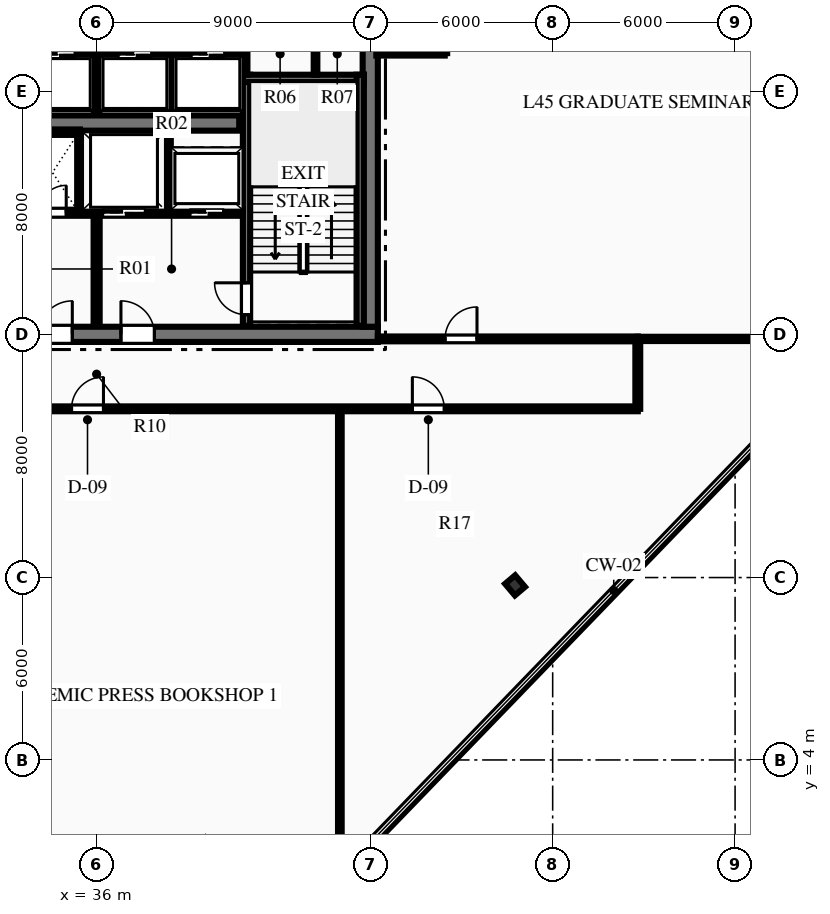
"""IFC4 building model, lengths in metres.
Left out: names, types, materials, properties, quantities, classifications, styles, units other than length and angle.
Written with IfcOpenShell. Run it as: python <this file> out.ifc"""

import sys

from ifc_helpers import new_model, si_unit, direction, frame, frame_2d, origin, origin_2d, place, context, subcontext, project, spatial, rectangle, i_section, extrude, element, fill, save


model = new_model("IFC4")
c1 = context("Model", 3, precision=1e-05, world=origin(), true_north=direction((0.0, 1.0)))
c2 = subcontext(c1, "Body", "Model", "MODEL_VIEW")
j1 = project(units=[si_unit("LENGTHUNIT", "METRE"), si_unit("PLANEANGLEUNIT", "RADIAN")], contexts=[c1])
p1 = place(None, origin())
s1 = spatial("IfcSite", under=j1, at=p1, CompositionType="ELEMENT")
p2 = place(p1, origin())
s2 = spatial("IfcBuilding", under=s1, at=p2, CompositionType="ELEMENT")
p3 = place(p2, frame((0.0, 0.0, 181.95)))
s3 = spatial("IfcBuildingStorey", under=s2, at=p3, CompositionType="ELEMENT", Elevation=181.95)
p4 = place(p3, frame((26.75, 18.0, 0.0), z_axis=(0.0, 0.0, 1.0), x_axis=(1.0, 0.0, 0.0)))
e1 = element("IfcWall", 1, at=p4, inside=s3, PredefinedType="SHEAR", context=c2, shape_type="SweptSolid", body=[
    extrude(rectangle(XDim=18.5, YDim=0.5, at=frame_2d((9.25, 0.0))), origin(), (0.0, 0.0, 1.0), 3.75),
])
p5 = place(p4, frame((7.35, 0.0, 0.0)))
e2 = element("IfcOpeningElement", 2, at=p5, cuts=e1, PredefinedType="OPENING", context=c2, shape_type="SweptSolid", body=[
    extrude(rectangle(XDim=1.1, YDim=2.15, at=frame_2d((0.55, 1.075))), frame((0.0, 0.26, 0.0), z_axis=(0.0, -1.0, 0.0), x_axis=(1.0, 0.0, 0.0)), (0.0, 0.0, 1.0), 0.52),
])
p6 = place(p4, frame((10.05, 0.0, 0.0)))
e3 = element("IfcOpeningElement", 3, at=p6, cuts=e1, PredefinedType="OPENING", context=c2, shape_type="SweptSolid", body=[
    extrude(rectangle(XDim=1.1, YDim=2.15, at=frame_2d((0.55, 1.075))), frame((0.0, 0.26, 0.0), z_axis=(0.0, -1.0, 0.0), x_axis=(1.0, 0.0, 0.0)), (0.0, 0.0, 1.0), 0.52),
])
p7 = place(p3, frame((45.0, 18.25, 0.0), z_axis=(0.0, 0.0, 1.0), x_axis=(0.0, 1.0, 0.0)))
e4 = element("IfcWall", 4, at=p7, inside=s3, PredefinedType="SHEAR", context=c2, shape_type="SweptSolid", body=[
    extrude(rectangle(XDim=15.5, YDim=0.5, at=frame_2d((7.75, 0.0))), origin(), (0.0, 0.0, 1.0), 3.75),
])
p8 = place(p7, frame((9.99, 0.0, 0.0)))
e5 = element("IfcOpeningElement", 5, at=p8, cuts=e4, PredefinedType="OPENING", context=c2, shape_type="SweptSolid", body=[
    extrude(rectangle(XDim=1.4, YDim=2.2, at=frame_2d((0.7, 1.1))), frame((0.0, 0.26, 0.0), z_axis=(0.0, -1.0, 0.0), x_axis=(1.0, 0.0, 0.0)), (0.0, 0.0, 1.0), 0.52),
])
p9 = place(p3, frame((31.31, 24.95, 0.0), z_axis=(0.0, 0.0, 1.0), x_axis=(1.0, 0.0, 0.0)))
e6 = element("IfcWall", 6, at=p9, inside=s3, PredefinedType="SHEAR", context=c2, shape_type="SweptSolid", body=[
    extrude(rectangle(XDim=9.38, YDim=0.5, at=frame_2d((4.69, 0.0))), origin(), (0.0, 0.0, 1.0), 3.75),
])
p10 = place(p3, frame((40.93, 18.28, 0.0), z_axis=(0.0, 0.0, 1.0), x_axis=(0.0, 1.0, 0.0)))
e7 = element("IfcWall", 7, at=p10, inside=s3, PredefinedType="SHEAR", context=c2, shape_type="SweptSolid", body=[
    extrude(rectangle(XDim=8.26, YDim=0.24, at=frame_2d((4.13, 0.0))), origin(), (0.0, 0.0, 1.0), 3.75),
])
p11 = place(p10, frame((0.365, 0.0, 0.0)))
e8 = element("IfcOpeningElement", 8, at=p11, cuts=e7, PredefinedType="OPENING", context=c2, shape_type="SweptSolid", body=[
    extrude(rectangle(XDim=1.05, YDim=2.15, at=frame_2d((0.525, 1.075))), frame((0.0, 0.13, 0.0), z_axis=(0.0, -1.0, 0.0), x_axis=(1.0, 0.0, 0.0)), (0.0, 0.0, 1.0), 0.26),
])
p12 = place(p3, frame((40.81, 26.42, 0.0), z_axis=(0.0, 0.0, 1.0), x_axis=(1.0, 0.0, 0.0)))
e9 = element("IfcWall", 9, at=p12, inside=s3, PredefinedType="SHEAR", context=c2, shape_type="SweptSolid", body=[
    extrude(rectangle(XDim=3.98, YDim=0.24, at=frame_2d((1.99, 0.0))), origin(), (0.0, 0.0, 1.0), 3.75),
])
p13 = place(p3, frame((44.67, 18.28, 0.0), z_axis=(0.0, 0.0, 1.0), x_axis=(0.0, 1.0, 0.0)))
e10 = element("IfcWall", 10, at=p13, inside=s3, PredefinedType="SHEAR", context=c2, shape_type="SweptSolid", body=[
    extrude(rectangle(XDim=8.26, YDim=0.24, at=frame_2d((4.13, 0.0))), origin(), (0.0, 0.0, 1.0), 3.75),
])
p14 = place(p3, frame((49.762, 9.743, 0.0), z_axis=(0.0, 0.0, 1.0), x_axis=(0.763232469783, 0.646123979643, 0.0)))
e11 = element("IfcColumn", 11, at=p14, inside=s3, PredefinedType="COLUMN", context=c2, shape_type="SweptSolid", body=[
    extrude(i_section(OverallWidth=0.432, OverallDepth=0.498, WebThickness=0.056, FlangeThickness=0.089, at=origin_2d()), origin(), (0.0, 0.0, 1.0), 3.75),
])
p15 = place(p3, frame((36.0, 18.28, 0.0), z_axis=(0.0, 0.0, 1.0), x_axis=(0.0, 1.0, 0.0)))
e12 = element("IfcWall", 12, at=p15, inside=s3, PredefinedType="PARTITIONING", context=c2, shape_type="SweptSolid", body=[
    extrude(rectangle(XDim=3.77, YDim=0.2, at=frame_2d((1.885, 0.0))), origin(), (0.0, 0.0, 1.0), 3.46),
])
p16 = place(p3, frame((31.19, 22.0, 0.0), z_axis=(0.0, 0.0, 1.0), x_axis=(1.0, 0.0, 0.0)))
e13 = element("IfcWall", 13, at=p16, inside=s3, PredefinedType="PARTITIONING", context=c2, shape_type="SweptSolid", body=[
    extrude(rectangle(XDim=4.69, YDim=0.2, at=frame_2d((2.345, 0.0))), origin(), (0.0, 0.0, 1.0), 3.46),
])
p17 = place(p16, frame((2.91, 0.0, 0.0)))
e14 = element("IfcOpeningElement", 14, at=p17, cuts=e13, PredefinedType="OPENING", context=c2, shape_type="SweptSolid", body=[
    extrude(rectangle(XDim=0.9, YDim=2.15, at=frame_2d((0.45, 1.075))), frame((0.0, 0.11, 0.0), z_axis=(0.0, -1.0, 0.0), x_axis=(1.0, 0.0, 0.0)), (0.0, 0.0, 1.0), 0.22),
])
p18 = place(p16, frame((0.635, 0.0, 0.0)))
e15 = element("IfcOpeningElement", 15, at=p18, cuts=e13, PredefinedType="OPENING", context=c2, shape_type="SweptSolid", body=[
    extrude(rectangle(XDim=1.1, YDim=2.15, at=frame_2d((0.55, 1.075))), frame((0.0, 0.11, 0.0), z_axis=(0.0, -1.0, 0.0), x_axis=(1.0, 0.0, 0.0)), (0.0, 0.0, 1.0), 0.22),
])
p19 = place(p3, frame((36.12, 22.0, 0.0), z_axis=(0.0, 0.0, 1.0), x_axis=(1.0, 0.0, 0.0)))
e16 = element("IfcWall", 16, at=p19, inside=s3, PredefinedType="PARTITIONING", context=c2, shape_type="SweptSolid", body=[
    extrude(rectangle(XDim=4.69, YDim=0.2, at=frame_2d((2.345, 0.0))), origin(), (0.0, 0.0, 1.0), 3.46),
])
p20 = place(p19, frame((2.955, 0.0, 0.0)))
e17 = element("IfcOpeningElement", 17, at=p20, cuts=e16, PredefinedType="OPENING", context=c2, shape_type="SweptSolid", body=[
    extrude(rectangle(XDim=1.1, YDim=2.15, at=frame_2d((0.55, 1.075))), frame((0.0, 0.11, 0.0), z_axis=(0.0, -1.0, 0.0), x_axis=(1.0, 0.0, 0.0)), (0.0, 0.0, 1.0), 0.22),
])
p21 = place(p19, frame((0.08, 0.0, 0.0)))
e18 = element("IfcOpeningElement", 18, at=p21, cuts=e16, PredefinedType="OPENING", context=c2, shape_type="SweptSolid", body=[
    extrude(rectangle(XDim=1.4, YDim=2.2, at=frame_2d((0.7, 1.1))), frame((0.0, 0.11, 0.0), z_axis=(0.0, -1.0, 0.0), x_axis=(1.0, 0.0, 0.0)), (0.0, 0.0, 1.0), 0.22),
])
p22 = place(p3, frame((35.45, 22.05, 0.0), z_axis=(0.0, 0.0, 1.0), x_axis=(0.0, 1.0, 0.0)))
e19 = element("IfcWall", 19, at=p22, inside=s3, PredefinedType="PARTITIONING", context=c2, shape_type="SweptSolid", body=[
    extrude(rectangle(XDim=2.6, YDim=0.18, at=frame_2d((1.3, 0.0))), origin(), (0.0, 0.0, 1.0), 3.46),
])
p23 = place(p3, frame((33.65, 24.65, 0.0), z_axis=(0.0, 0.0, 1.0), x_axis=(1.0, 0.0, 0.0)))
e20 = element("IfcWall", 20, at=p23, inside=s3, PredefinedType="PARTITIONING", context=c2, shape_type="SweptSolid", body=[
    extrude(rectangle(XDim=1.8, YDim=0.18, at=frame_2d((0.9, 0.0))), origin(), (0.0, 0.0, 1.0), 3.46),
])
p24 = place(p3, frame((38.35, 22.05, 0.0), z_axis=(0.0, 0.0, 1.0), x_axis=(0.0, 1.0, 0.0)))
e21 = element("IfcWall", 21, at=p24, inside=s3, PredefinedType="PARTITIONING", context=c2, shape_type="SweptSolid", body=[
    extrude(rectangle(XDim=2.6, YDim=0.18, at=frame_2d((1.3, 0.0))), origin(), (0.0, 0.0, 1.0), 3.46),
])
p25 = place(p3, frame((40.88, 26.54, 0.0), z_axis=(0.0, 0.0, 1.0), x_axis=(0.0, 1.0, 0.0)))
e22 = element("IfcWall", 22, at=p25, inside=s3, PredefinedType="PARTITIONING", context=c2, shape_type="SweptSolid", body=[
    extrude(rectangle(XDim=1.51, YDim=0.16, at=frame_2d((0.755, 0.0))), origin(), (0.0, 0.0, 1.0), 3.46),
])
p26 = place(p3, frame((43.2, 26.54, 0.0), z_axis=(0.0, 0.0, 1.0), x_axis=(0.0, 1.0, 0.0)))
e23 = element("IfcWall", 23, at=p26, inside=s3, PredefinedType="PARTITIONING", context=c2, shape_type="SweptSolid", body=[
    extrude(rectangle(XDim=1.44, YDim=0.12, at=frame_2d((0.72, 0.0))), origin(), (0.0, 0.0, 1.0), 3.46),
])
p27 = place(p3, frame((31.2, 27.2, 0.0), z_axis=(0.0, 0.0, 1.0), x_axis=(1.0, 0.0, 0.0)))
e24 = element("IfcWall", 24, at=p27, inside=s3, PredefinedType="PARTITIONING", context=c2, shape_type="SweptSolid", body=[
    extrude(rectangle(XDim=9.6, YDim=0.18, at=frame_2d((4.8, 0.0))), origin(), (0.0, 0.0, 1.0), 3.46),
])
p28 = place(p27, frame((0.59, 0.0, 0.0)))
e25 = element("IfcOpeningElement", 25, at=p28, cuts=e24, PredefinedType="OPENING", context=c2, shape_type="SweptSolid", body=[
    extrude(rectangle(XDim=1.1, YDim=2.15, at=frame_2d((0.55, 1.075))), frame((0.0, 0.1, 0.0), z_axis=(0.0, -1.0, 0.0), x_axis=(1.0, 0.0, 0.0)), (0.0, 0.0, 1.0), 0.2),
])
p29 = place(p27, frame((2.99, 0.0, 0.0)))
e26 = element("IfcOpeningElement", 26, at=p29, cuts=e24, PredefinedType="OPENING", context=c2, shape_type="SweptSolid", body=[
    extrude(rectangle(XDim=1.1, YDim=2.15, at=frame_2d((0.55, 1.075))), frame((0.0, 0.1, 0.0), z_axis=(0.0, -1.0, 0.0), x_axis=(1.0, 0.0, 0.0)), (0.0, 0.0, 1.0), 0.2),
])
p30 = place(p27, frame((5.51, 0.0, 0.0)))
e27 = element("IfcOpeningElement", 27, at=p30, cuts=e24, PredefinedType="OPENING", context=c2, shape_type="SweptSolid", body=[
    extrude(rectangle(XDim=1.1, YDim=2.15, at=frame_2d((0.55, 1.075))), frame((0.0, 0.1, 0.0), z_axis=(0.0, -1.0, 0.0), x_axis=(1.0, 0.0, 0.0)), (0.0, 0.0, 1.0), 0.2),
])
p31 = place(p27, frame((7.91, 0.0, 0.0)))
e28 = element("IfcOpeningElement", 28, at=p31, cuts=e24, PredefinedType="OPENING", context=c2, shape_type="SweptSolid", body=[
    extrude(rectangle(XDim=1.1, YDim=2.15, at=frame_2d((0.55, 1.075))), frame((0.0, 0.1, 0.0), z_axis=(0.0, -1.0, 0.0), x_axis=(1.0, 0.0, 0.0)), (0.0, 0.0, 1.0), 0.2),
])
for number, where, z_axis, x_axis in (
    (29, (36.0, 25.3, 0.0), (0.0, 0.0, 1.0), (0.0, 1.0, 0.0)),
    (30, (38.46, 25.3, 0.0), (0.0, 0.0, 1.0), (0.0, 1.0, 0.0)),
):
    element("IfcWall", number, at=place(p3, frame(where, z_axis=z_axis, x_axis=x_axis)), inside=s3, PredefinedType="PARTITIONING", context=c2, shape_type="SweptSolid", body=[
        extrude(rectangle(XDim=1.9, YDim=0.18, at=frame_2d((0.95, 0.0))), origin(), (0.0, 0.0, 1.0), 3.46),
    ])
p32 = place(p3, frame((18.2, 15.55, 0.0), z_axis=(0.0, 0.0, 1.0), x_axis=(1.0, 0.0, 0.0)))
e31 = element("IfcWall", 31, at=p32, inside=s3, PredefinedType="PARTITIONING", context=c2, shape_type="SweptSolid", body=[
    extrude(rectangle(XDim=35.6, YDim=0.16, at=frame_2d((17.8, 0.0))), origin(), (0.0, 0.0, 1.0), 3.46),
])
p33 = place(p32, frame((7.55, 0.0, 0.0)))
e32 = element("IfcOpeningElement", 32, at=p33, cuts=e31, PredefinedType="OPENING", context=c2, shape_type="SweptSolid", body=[
    extrude(rectangle(XDim=0.9, YDim=2.15, at=frame_2d((0.45, 1.075))), frame((0.0, 0.09, 0.0), z_axis=(0.0, -1.0, 0.0), x_axis=(1.0, 0.0, 0.0)), (0.0, 0.0, 1.0), 0.18),
])
p34 = place(p32, frame((9.85, 0.0, 0.0)))
e33 = element("IfcOpeningElement", 33, at=p34, cuts=e31, PredefinedType="OPENING", context=c2, shape_type="SweptSolid", body=[
    extrude(rectangle(XDim=0.9, YDim=2.15, at=frame_2d((0.45, 1.075))), frame((0.0, 0.09, 0.0), z_axis=(0.0, -1.0, 0.0), x_axis=(1.0, 0.0, 0.0)), (0.0, 0.0, 1.0), 0.18),
])
p35 = place(p32, frame((12.1, 0.0, 0.0)))
e34 = element("IfcOpeningElement", 34, at=p35, cuts=e31, PredefinedType="OPENING", context=c2, shape_type="SweptSolid", body=[
    extrude(rectangle(XDim=1.0, YDim=2.15, at=frame_2d((0.5, 1.075))), frame((0.0, 0.09, 0.0), z_axis=(0.0, -1.0, 0.0), x_axis=(1.0, 0.0, 0.0)), (0.0, 0.0, 1.0), 0.18),
])
p36 = place(p32, frame((16.975, 0.0, 0.0)))
e35 = element("IfcOpeningElement", 35, at=p36, cuts=e31, PredefinedType="OPENING", context=c2, shape_type="SweptSolid", body=[
    extrude(rectangle(XDim=1.05, YDim=2.15, at=frame_2d((0.525, 1.075))), frame((0.0, 0.09, 0.0), z_axis=(0.0, -1.0, 0.0), x_axis=(1.0, 0.0, 0.0)), (0.0, 0.0, 1.0), 0.18),
])
p37 = place(p32, frame((28.185, 0.0, 0.0)))
e36 = element("IfcOpeningElement", 36, at=p37, cuts=e31, PredefinedType="OPENING", context=c2, shape_type="SweptSolid", body=[
    extrude(rectangle(XDim=1.05, YDim=2.15, at=frame_2d((0.525, 1.075))), frame((0.0, 0.09, 0.0), z_axis=(0.0, -1.0, 0.0), x_axis=(1.0, 0.0, 0.0)), (0.0, 0.0, 1.0), 0.18),
])
p38 = place(p3, frame((45.25, 17.85, 0.0), z_axis=(0.0, 0.0, 1.0), x_axis=(1.0, 0.0, 0.0)))
e37 = element("IfcWall", 37, at=p38, inside=s3, PredefinedType="PARTITIONING", context=c2, shape_type="SweptSolid", body=[
    extrude(rectangle(XDim=8.55, YDim=0.16, at=frame_2d((4.275, 0.0))), origin(), (0.0, 0.0, 1.0), 2.839),
])
p39 = place(p38, frame((2.211, 0.0, 0.0)))
e38 = element("IfcOpeningElement", 38, at=p39, cuts=e37, PredefinedType="OPENING", context=c2, shape_type="SweptSolid", body=[
    extrude(rectangle(XDim=1.05, YDim=2.15, at=frame_2d((0.525, 1.075))), frame((0.0, 0.09, 0.0), z_axis=(0.0, -1.0, 0.0), x_axis=(1.0, 0.0, 0.0)), (0.0, 0.0, 1.0), 0.18),
])
p40 = place(p3, frame((47.45, 27.25, 0.0), z_axis=(0.0, 0.0, 1.0), x_axis=(0.0, 1.0, 0.0)))
e39 = element("IfcWall", 39, at=p40, inside=s3, PredefinedType="PARTITIONING", context=c2, shape_type="SweptSolid", body=[
    extrude(rectangle(XDim=6.9, YDim=0.16, at=frame_2d((3.45, 0.0))), origin(), (0.0, 0.0, 1.0), 3.46),
])
p41 = place(p3, frame((45.2, 27.25, 0.0), z_axis=(0.0, 0.0, 1.0), x_axis=(1.0, 0.0, 0.0)))
e40 = element("IfcWall", 40, at=p41, inside=s3, PredefinedType="PARTITIONING", context=c2, shape_type="SweptSolid", body=[
    extrude(rectangle(XDim=2.25, YDim=0.16, at=frame_2d((1.125, 0.0))), origin(), (0.0, 0.0, 1.0), 3.46),
])
p42 = place(p3, frame((53.8, 15.55, 0.0), z_axis=(0.0, 0.0, 1.0), x_axis=(0.0, 1.0, 0.0)))
e41 = element("IfcWall", 41, at=p42, inside=s3, PredefinedType="PARTITIONING", context=c2, shape_type="SweptSolid", body=[
    extrude(rectangle(XDim=2.3, YDim=0.16, at=frame_2d((1.15, 0.0))), origin(), (0.0, 0.0, 1.0), 3.46),
])
p43 = place(p3, frame((53.8, 17.85, 0.0), z_axis=(0.0, 0.0, 1.0), x_axis=(1.0, 0.0, 0.0)))
e42 = element("IfcWall", 42, at=p43, inside=s3, PredefinedType="PARTITIONING", context=c2, shape_type="SweptSolid", body=[
    extrude(rectangle(XDim=7.395, YDim=0.14, at=frame_2d((3.697, 0.0))), origin(), (0.0, 0.0, 1.0), 2.839),
])
p44 = place(p3, frame((44.0, 0.044, 0.0), z_axis=(0.0, 0.0, 1.0), x_axis=(0.0, 1.0, 0.0)))
e43 = element("IfcWall", 43, at=p44, inside=s3, PredefinedType="PARTITIONING", context=c2, shape_type="SweptSolid", body=[
    extrude(rectangle(XDim=15.506, YDim=0.12, at=frame_2d((7.753, 0.0))), origin(), (0.0, 0.0, 1.0), 3.46),
])
p45 = place(p11, origin())
e44 = element("IfcDoor", 44, at=p45, inside=s3, OperationType="SINGLE_SWING_RIGHT", PredefinedType="DOOR", context=c2, shape_type="SweptSolid", body=[
    extrude(rectangle(XDim=1.05, YDim=2.15, at=frame_2d((0.525, 1.075))), frame((0.0, 0.025, 0.0), z_axis=(0.0, -1.0, 0.0), x_axis=(1.0, 0.0, 0.0)), (0.0, 0.0, 1.0), 0.05),
])
fill(e8, e44)
p46 = place(p5, origin())
e45 = element("IfcDoor", 45, at=p46, inside=s3, OperationType="SINGLE_SWING_RIGHT", PredefinedType="DOOR", context=c2, shape_type="SweptSolid", body=[
    extrude(rectangle(XDim=1.1, YDim=2.15, at=frame_2d((0.55, 1.075))), frame((0.0, 0.025, 0.0), z_axis=(0.0, -1.0, 0.0), x_axis=(1.0, 0.0, 0.0)), (0.0, 0.0, 1.0), 0.05),
])
fill(e2, e45)
p47 = place(p6, origin())
e46 = element("IfcDoor", 46, at=p47, inside=s3, OperationType="SINGLE_SWING_LEFT", PredefinedType="DOOR", context=c2, shape_type="SweptSolid", body=[
    extrude(rectangle(XDim=1.1, YDim=2.15, at=frame_2d((0.55, 1.075))), frame((0.0, 0.025, 0.0), z_axis=(0.0, -1.0, 0.0), x_axis=(1.0, 0.0, 0.0)), (0.0, 0.0, 1.0), 0.05),
])
fill(e3, e46)
p48 = place(p17, origin())
e47 = element("IfcDoor", 47, at=p48, inside=s3, OperationType="SINGLE_SWING_RIGHT", PredefinedType="DOOR", context=c2, shape_type="SweptSolid", body=[
    extrude(rectangle(XDim=0.9, YDim=2.15, at=frame_2d((0.45, 1.075))), frame((0.0, 0.025, 0.0), z_axis=(0.0, -1.0, 0.0), x_axis=(1.0, 0.0, 0.0)), (0.0, 0.0, 1.0), 0.05),
])
fill(e14, e47)
p49 = place(p36, origin())
e48 = element("IfcDoor", 48, at=p49, inside=s3, OperationType="SINGLE_SWING_RIGHT", PredefinedType="DOOR", context=c2, shape_type="SweptSolid", body=[
    extrude(rectangle(XDim=1.05, YDim=2.15, at=frame_2d((0.525, 1.075))), frame((0.0, 0.025, 0.0), z_axis=(0.0, -1.0, 0.0), x_axis=(1.0, 0.0, 0.0)), (0.0, 0.0, 1.0), 0.05),
])
fill(e35, e48)
p50 = place(p37, origin())
e49 = element("IfcDoor", 49, at=p50, inside=s3, OperationType="SINGLE_SWING_LEFT", PredefinedType="DOOR", context=c2, shape_type="SweptSolid", body=[
    extrude(rectangle(XDim=1.05, YDim=2.15, at=frame_2d((0.525, 1.075))), frame((0.0, 0.025, 0.0), z_axis=(0.0, -1.0, 0.0), x_axis=(1.0, 0.0, 0.0)), (0.0, 0.0, 1.0), 0.05),
])
fill(e36, e49)
p51 = place(p39, origin())
e50 = element("IfcDoor", 50, at=p51, inside=s3, OperationType="SINGLE_SWING_RIGHT", PredefinedType="DOOR", context=c2, shape_type="SweptSolid", body=[
    extrude(rectangle(XDim=1.05, YDim=2.15, at=frame_2d((0.525, 1.075))), frame((0.0, 0.025, 0.0), z_axis=(0.0, -1.0, 0.0), x_axis=(1.0, 0.0, 0.0)), (0.0, 0.0, 1.0), 0.05),
])
fill(e38, e50)
p52 = place(p29, origin())
e51 = element("IfcDoor", 51, at=p52, inside=s3, OperationType="SLIDING_TO_LEFT", PredefinedType="DOOR", context=c2, shape_type="SweptSolid", body=[
    extrude(rectangle(XDim=1.1, YDim=2.15, at=frame_2d((0.55, 1.075))), frame((0.0, 0.025, 0.0), z_axis=(0.0, -1.0, 0.0), x_axis=(1.0, 0.0, 0.0)), (0.0, 0.0, 1.0), 0.05),
])
fill(e26, e51)
p53 = place(p30, origin())
e52 = element("IfcDoor", 52, at=p53, inside=s3, OperationType="SLIDING_TO_LEFT", PredefinedType="DOOR", context=c2, shape_type="SweptSolid", body=[
    extrude(rectangle(XDim=1.1, YDim=2.15, at=frame_2d((0.55, 1.075))), frame((0.0, 0.025, 0.0), z_axis=(0.0, -1.0, 0.0), x_axis=(1.0, 0.0, 0.0)), (0.0, 0.0, 1.0), 0.05),
])
fill(e27, e52)
p54 = place(p31, origin())
e53 = element("IfcDoor", 53, at=p54, inside=s3, OperationType="SLIDING_TO_LEFT", PredefinedType="DOOR", context=c2, shape_type="SweptSolid", body=[
    extrude(rectangle(XDim=1.1, YDim=2.15, at=frame_2d((0.55, 1.075))), frame((0.0, 0.025, 0.0), z_axis=(0.0, -1.0, 0.0), x_axis=(1.0, 0.0, 0.0)), (0.0, 0.0, 1.0), 0.05),
])
fill(e28, e53)
p55 = place(p20, origin())
e54 = element("IfcDoor", 54, at=p55, inside=s3, OperationType="SLIDING_TO_LEFT", PredefinedType="DOOR", context=c2, shape_type="SweptSolid", body=[
    extrude(rectangle(XDim=1.1, YDim=2.15, at=frame_2d((0.55, 1.075))), frame((0.0, 0.025, 0.0), z_axis=(0.0, -1.0, 0.0), x_axis=(1.0, 0.0, 0.0)), (0.0, 0.0, 1.0), 0.05),
])
fill(e17, e54)
p56 = place(p21, origin())
e55 = element("IfcDoor", 55, at=p56, inside=s3, OperationType="SLIDING_TO_LEFT", PredefinedType="DOOR", context=c2, shape_type="SweptSolid", body=[
    extrude(rectangle(XDim=1.4, YDim=2.2, at=frame_2d((0.7, 1.1))), frame((0.0, 0.025, 0.0), z_axis=(0.0, -1.0, 0.0), x_axis=(1.0, 0.0, 0.0)), (0.0, 0.0, 1.0), 0.05),
])
fill(e18, e55)
save(model, sys.argv[1])
